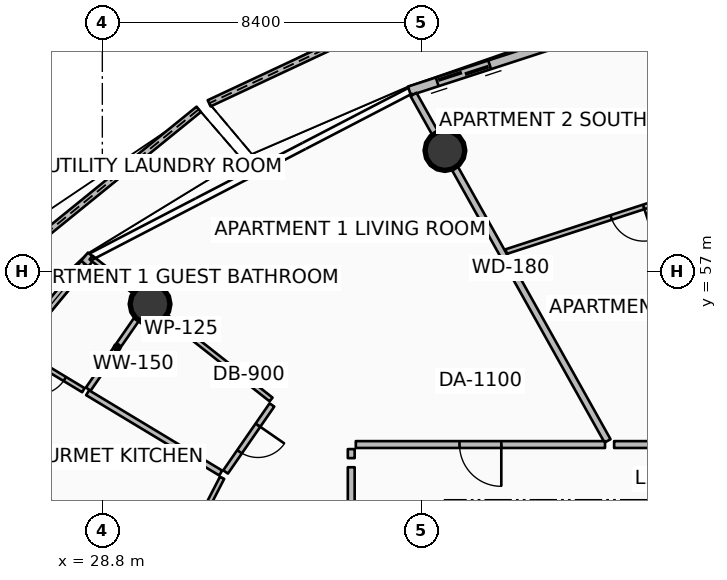
"""IFC4 building model, lengths in metres.
Left out: names, types, materials, properties, quantities, classifications, styles, units other than length and angle.
Written with IfcOpenShell. Run it as: python <this file> out.ifc"""

import sys

from ifc_helpers import new_model, si_unit, direction, frame, frame_2d, origin, origin_2d, place, context, subcontext, project, spatial, polyline, rectangle, circle, outline, extrude, element, fill, save


model = new_model("IFC4")
c1 = context("Model", 3, precision=1e-05, world=origin(), true_north=direction((0.0, 1.0)))
c2 = subcontext(c1, "Body", "Model", "MODEL_VIEW")
j1 = project(units=[si_unit("LENGTHUNIT", "METRE"), si_unit("PLANEANGLEUNIT", "RADIAN")], contexts=[c1])
p1 = place(None, origin())
s1 = spatial("IfcSite", under=j1, at=p1, CompositionType="ELEMENT")
p2 = place(p1, origin())
s2 = spatial("IfcBuilding", under=s1, at=p2, CompositionType="ELEMENT")
p3 = place(p2, frame((0.0, 0.0, 217.8)))
s3 = spatial("IfcBuildingStorey", under=s2, at=p3, CompositionType="ELEMENT", Elevation=217.8)
for number, where, z_axis, x_axis in (
    (1, (37.815, 60.186, 0.0), (0.0, 0.0, 1.0), (1.0, 0.0, 0.0)),
    (2, (30.056, 56.146, 0.0), (0.0, 0.0, 1.0), (1.0, 0.0, 0.0)),
):
    element("IfcColumn", number, at=place(p3, frame(where, z_axis=z_axis, x_axis=x_axis)), inside=s3, PredefinedType="COLUMN", context=c2, shape_type="SweptSolid", body=[
        extrude(circle(Radius=0.525, at=origin_2d()), origin(), (0.0, 0.0, 1.0), 3.5),
    ])
p4 = place(p3, frame((40.248, 65.472, 0.0), z_axis=(0.0, 0.0, 1.0), x_axis=(-0.905654672332, -0.42401605451, 0.0)))
e3 = element("IfcWall", 3, at=p4, inside=s3, PredefinedType="PARAPET", context=c2, shape_type="SweptSolid", body=[
    extrude(outline(polyline([(0.0, 0.0), (9.537, 0.0), (9.537, 1.233), (4.769, 1.418), (0.0, 1.632), (0.0, 0.0)])), frame((0.0, 0.09, 0.0), z_axis=(0.0, -1.0, 0.0), x_axis=(1.0, 0.0, 0.0)), (0.0, 0.0, 1.0), 0.18),
])
p5 = place(p3, frame((31.337, 61.271, 0.0), z_axis=(0.0, 0.0, 1.0), x_axis=(-0.776456761235, -0.630170530834, 0.0)))
e4 = element("IfcWall", 4, at=p5, inside=s3, PredefinedType="PARAPET", context=c2, shape_type="SweptSolid", body=[
    extrude(outline(polyline([(0.0, 0.0), (10.389, 0.0), (10.389, 1.148), (5.195, 1.127), (0.0, 1.224), (0.0, 0.0)])), frame((0.0, 0.09, 0.0), z_axis=(0.0, -1.0, 0.0), x_axis=(1.0, 0.0, 0.0)), (0.0, 0.0, 1.0), 0.18),
])
p6 = place(p3, frame((45.384, 64.519, 0.0), z_axis=(0.0, 0.0, 1.0), x_axis=(-0.951058543936, -0.309010753869, 0.0)))
e5 = element("IfcWall", 5, at=p6, inside=s3, PredefinedType="SOLIDWALL", context=c2, shape_type="SweptSolid", body=[
    extrude(rectangle(XDim=8.942, YDim=0.24, at=frame_2d((4.471, 0.0))), origin(), (0.0, 0.0, 1.0), 2.45),
])
p7 = place(p6, frame((6.722, 0.0, 0.0)))
e6 = element("IfcOpeningElement", 6, at=p7, cuts=e5, PredefinedType="OPENING", context=c2, shape_type="SweptSolid", body=[
    extrude(rectangle(XDim=1.45, YDim=2.15, at=frame_2d((0.725, 1.075))), frame((0.0, 0.13, 0.0), z_axis=(0.0, -1.0, 0.0), x_axis=(1.0, 0.0, 0.0)), (0.0, 0.0, 1.0), 0.26),
])
p8 = place(p6, frame((0.28, 0.0, 0.65)))
e7 = element("IfcOpeningElement", 7, at=p8, cuts=e5, PredefinedType="OPENING", context=c2, shape_type="SweptSolid", body=[
    extrude(rectangle(XDim=1.6, YDim=1.5, at=frame_2d((0.8, 0.75))), frame((0.0, 0.13, 0.0), z_axis=(0.0, -1.0, 0.0), x_axis=(1.0, 0.0, 0.0)), (0.0, 0.0, 1.0), 0.26),
])
p9 = place(p3, frame((28.515, 57.424, 0.0), z_axis=(0.0, 0.0, 1.0), x_axis=(-0.636759394418, -0.771062561418, 0.0)))
e8 = element("IfcWall", 8, at=p9, inside=s3, PredefinedType="SOLIDWALL", context=c2, shape_type="SweptSolid", body=[
    extrude(rectangle(XDim=10.494, YDim=0.24, at=frame_2d((5.247, 0.0))), origin(), (0.0, 0.0, 1.0), 2.45),
])
p10 = place(p9, frame((8.274, 0.0, 0.0)))
e9 = element("IfcOpeningElement", 9, at=p10, cuts=e8, PredefinedType="OPENING", context=c2, shape_type="SweptSolid", body=[
    extrude(rectangle(XDim=1.45, YDim=2.15, at=frame_2d((0.725, 1.075))), frame((0.0, 0.13, 0.0), z_axis=(0.0, -1.0, 0.0), x_axis=(1.0, 0.0, 0.0)), (0.0, 0.0, 1.0), 0.26),
])
p11 = place(p9, frame((0.28, 0.0, 0.65)))
e10 = element("IfcOpeningElement", 10, at=p11, cuts=e8, PredefinedType="OPENING", context=c2, shape_type="SweptSolid", body=[
    extrude(rectangle(XDim=1.6, YDim=1.5, at=frame_2d((0.8, 0.75))), frame((0.0, 0.13, 0.0), z_axis=(0.0, -1.0, 0.0), x_axis=(1.0, 0.0, 0.0)), (0.0, 0.0, 1.0), 0.26),
])
p12 = place(p3, frame((42.094, 52.546, 0.0), z_axis=(0.0, 0.0, 1.0), x_axis=(-0.488614041717, 0.872500039104, 0.0)))
e11 = element("IfcWall", 11, at=p12, inside=s3, PredefinedType="PARTITIONING", context=c2, shape_type="SweptSolid", body=[
    extrude(rectangle(XDim=10.448, YDim=0.18, at=frame_2d((5.224, 0.0))), origin(), (0.0, 0.0, 1.0), 2.94),
])
p13 = place(p3, frame((42.028, 52.45, 0.0), z_axis=(0.0, 0.0, 1.0), x_axis=(-1.0, 0.0, 0.0)))
e12 = element("IfcWall", 12, at=p13, inside=s3, PredefinedType="PARTITIONING", context=c2, shape_type="SweptSolid", body=[
    extrude(rectangle(XDim=6.558, YDim=0.18, at=frame_2d((3.279, 0.0))), origin(), (0.0, 0.0, 1.0), 2.94),
])
p14 = place(p13, frame((2.729, 0.0, 0.0)))
e13 = element("IfcOpeningElement", 13, at=p14, cuts=e12, PredefinedType="OPENING", context=c2, shape_type="SweptSolid", body=[
    extrude(rectangle(XDim=1.1, YDim=2.1, at=frame_2d((0.55, 1.05))), frame((0.0, 0.1, 0.0), z_axis=(0.0, -1.0, 0.0), x_axis=(1.0, 0.0, 0.0)), (0.0, 0.0, 1.0), 0.2),
])
p15 = place(p3, frame((35.35, 52.33, 0.0), z_axis=(0.0, 0.0, 1.0), x_axis=(0.0, -1.0, 0.0)))
e14 = element("IfcWall", 14, at=p15, inside=s3, PredefinedType="PARTITIONING", context=c2, shape_type="SweptSolid", body=[
    extrude(rectangle(XDim=0.238, YDim=0.18, at=frame_2d((0.119, 0.0))), origin(), (0.0, 0.0, 1.0), 2.94),
])
p16 = place(p3, frame((35.35, 51.853, 0.0), z_axis=(0.0, 0.0, 1.0), x_axis=(0.0, -1.0, 0.0)))
e15 = element("IfcWall", 15, at=p16, inside=s3, PredefinedType="PARTITIONING", context=c2, shape_type="SweptSolid", body=[
    extrude(rectangle(XDim=6.165, YDim=0.18, at=frame_2d((3.083, 0.0))), origin(), (0.0, 0.0, 1.0), 2.94),
])
p17 = place(p3, frame((33.241, 53.635, 0.0), z_axis=(0.0, 0.0, 1.0), x_axis=(-0.785321754625, 0.619087830371, 0.0)))
e16 = element("IfcWall", 16, at=p17, inside=s3, PredefinedType="PARTITIONING", context=c2, shape_type="SweptSolid", body=[
    extrude(rectangle(XDim=6.033, YDim=0.125, at=frame_2d((3.017, 0.0))), origin(), (0.0, 0.0, 1.0), 2.94),
])
p18 = place(p3, frame((33.262, 53.491, 0.0), z_axis=(0.0, 0.0, 1.0), x_axis=(-0.568919673568, -0.822393096413, 0.0)))
e17 = element("IfcWall", 17, at=p18, inside=s3, PredefinedType="PARTITIONING", context=c2, shape_type="SweptSolid", body=[
    extrude(rectangle(XDim=2.143, YDim=0.15, at=frame_2d((1.072, 0.0))), origin(), (0.0, 0.0, 1.0), 2.94),
])
p19 = place(p18, frame((0.646, 0.0, 0.0)))
e18 = element("IfcOpeningElement", 18, at=p19, cuts=e17, PredefinedType="OPENING", context=c2, shape_type="SweptSolid", body=[
    extrude(rectangle(XDim=0.85, YDim=2.06, at=frame_2d((0.425, 1.03))), frame((0.0, 0.085, 0.0), z_axis=(0.0, -1.0, 0.0), x_axis=(1.0, 0.0, 0.0)), (0.0, 0.0, 1.0), 0.17),
])
p20 = place(p3, frame((29.948, 56.104, 0.0), z_axis=(0.0, 0.0, 1.0), x_axis=(-0.568843740651, -0.822445620526, 0.0)))
e19 = element("IfcWall", 19, at=p20, inside=s3, PredefinedType="PARTITIONING", context=c2, shape_type="SweptSolid", body=[
    extrude(rectangle(XDim=2.669, YDim=0.15, at=frame_2d((1.335, 0.0))), origin(), (0.0, 0.0, 1.0), 2.94),
])
p21 = place(p3, frame((31.915, 51.701, 0.0), z_axis=(0.0, 0.0, 1.0), x_axis=(-0.856305556185, 0.516469548422, 0.0)))
e20 = element("IfcWall", 20, at=p21, inside=s3, PredefinedType="PARTITIONING", context=c2, shape_type="SweptSolid", body=[
    extrude(rectangle(XDim=4.09, YDim=0.15, at=frame_2d((2.045, 0.0))), origin(), (0.0, 0.0, 1.0), 2.94),
])
p22 = place(p3, frame((28.302, 53.881, 0.0), z_axis=(0.0, 0.0, 1.0), x_axis=(-0.856354175531, 0.516388929056, 0.0)))
e21 = element("IfcWall", 21, at=p22, inside=s3, PredefinedType="PARTITIONING", context=c2, shape_type="SweptSolid", body=[
    extrude(rectangle(XDim=1.99, YDim=0.125, at=frame_2d((0.995, 0.0))), origin(), (0.0, 0.0, 1.0), 2.94),
])
p23 = place(p22, frame((0.57, 0.0, 0.0)))
e22 = element("IfcOpeningElement", 22, at=p23, cuts=e21, PredefinedType="OPENING", context=c2, shape_type="SweptSolid", body=[
    extrude(rectangle(XDim=0.85, YDim=2.06, at=frame_2d((0.425, 1.03))), frame((0.0, 0.073, 0.0), z_axis=(0.0, -1.0, 0.0), x_axis=(1.0, 0.0, 0.0)), (0.0, 0.0, 1.0), 0.145),
])
p24 = place(p3, frame((30.764, 49.467, 0.0), z_axis=(0.0, 0.0, 1.0), x_axis=(-0.917605566125, 0.397492169755, 0.0)))
e23 = element("IfcWall", 23, at=p24, inside=s3, PredefinedType="PARTITIONING", context=c2, shape_type="SweptSolid", body=[
    extrude(rectangle(XDim=6.955, YDim=0.125, at=frame_2d((3.477, 0.0))), origin(), (0.0, 0.0, 1.0), 2.94),
])
p25 = place(p3, frame((31.951, 51.575, 0.0), z_axis=(0.0, 0.0, 1.0), x_axis=(-0.458029312051, -0.88893708962, 0.0)))
e24 = element("IfcWall", 24, at=p25, inside=s3, PredefinedType="PARTITIONING", context=c2, shape_type="SweptSolid", body=[
    extrude(rectangle(XDim=2.332, YDim=0.125, at=frame_2d((1.166, 0.0))), origin(), (0.0, 0.0, 1.0), 2.94),
])
p26 = place(p25, frame((0.741, 0.0, 0.0)))
e25 = element("IfcOpeningElement", 25, at=p26, cuts=e24, PredefinedType="OPENING", context=c2, shape_type="SweptSolid", body=[
    extrude(rectangle(XDim=0.85, YDim=2.06, at=frame_2d((0.425, 1.03))), frame((0.0, 0.073, 0.0), z_axis=(0.0, -1.0, 0.0), x_axis=(1.0, 0.0, 0.0)), (0.0, 0.0, 1.0), 0.145),
])
p27 = place(p3, frame((46.643, 52.45, 0.0), z_axis=(0.0, 0.0, 1.0), x_axis=(-1.0, 0.0, 0.0)))
e26 = element("IfcWall", 26, at=p27, inside=s3, PredefinedType="PARTITIONING", context=c2, shape_type="SweptSolid", body=[
    extrude(rectangle(XDim=4.376, YDim=0.18, at=frame_2d((2.188, 0.0))), origin(), (0.0, 0.0, 1.0), 2.94),
])
p28 = place(p3, frame((45.808, 59.6, 0.0), z_axis=(0.0, 0.0, 1.0), x_axis=(-0.951057868445, -0.309012832854, 0.0)))
e27 = element("IfcWall", 27, at=p28, inside=s3, PredefinedType="PARTITIONING", context=c2, shape_type="SweptSolid", body=[
    extrude(rectangle(XDim=6.708, YDim=0.125, at=frame_2d((3.354, 0.0))), origin(), (0.0, 0.0, 1.0), 2.94),
])
p29 = place(p28, frame((2.904, 0.0, 0.0)))
e28 = element("IfcOpeningElement", 28, at=p29, cuts=e27, PredefinedType="OPENING", context=c2, shape_type="SweptSolid", body=[
    extrude(rectangle(XDim=0.9, YDim=2.08, at=frame_2d((0.45, 1.04))), frame((0.0, 0.073, 0.0), z_axis=(0.0, -1.0, 0.0), x_axis=(1.0, 0.0, 0.0)), (0.0, 0.0, 1.0), 0.145),
])
p30 = place(p7, origin())
e29 = element("IfcDoor", 29, at=p30, inside=s3, OperationType="DOUBLE_DOOR_SLIDING", PredefinedType="DOOR", context=c2, shape_type="SweptSolid", body=[
    extrude(rectangle(XDim=1.45, YDim=2.15, at=frame_2d((0.725, 1.075))), frame((0.0, 0.025, 0.0), z_axis=(0.0, -1.0, 0.0), x_axis=(1.0, 0.0, 0.0)), (0.0, 0.0, 1.0), 0.05),
])
fill(e6, e29)
p31 = place(p11, origin())
e30 = element("IfcWindow", 30, at=p31, inside=s3, PartitioningType="SINGLE_PANEL", PredefinedType="WINDOW", context=c2, shape_type="SweptSolid", body=[
    extrude(rectangle(XDim=1.6, YDim=1.5, at=frame_2d((0.8, 0.75))), frame((0.0, 0.03, 0.0), z_axis=(0.0, -1.0, 0.0), x_axis=(1.0, 0.0, 0.0)), (0.0, 0.0, 1.0), 0.06),
])
fill(e10, e30)
p32 = place(p14, origin())
e31 = element("IfcDoor", 31, at=p32, inside=s3, OperationType="SINGLE_SWING_LEFT", PredefinedType="DOOR", context=c2, shape_type="SweptSolid", body=[
    extrude(rectangle(XDim=1.1, YDim=2.1, at=frame_2d((0.55, 1.05))), frame((0.0, 0.025, 0.0), z_axis=(0.0, -1.0, 0.0), x_axis=(1.0, 0.0, 0.0)), (0.0, 0.0, 1.0), 0.05),
])
fill(e13, e31)
p33 = place(p19, origin())
e32 = element("IfcDoor", 32, at=p33, inside=s3, OperationType="SINGLE_SWING_LEFT", PredefinedType="DOOR", context=c2, shape_type="SweptSolid", body=[
    extrude(rectangle(XDim=0.85, YDim=2.06, at=frame_2d((0.425, 1.03))), frame((0.0, 0.025, 0.0), z_axis=(0.0, -1.0, 0.0), x_axis=(1.0, 0.0, 0.0)), (0.0, 0.0, 1.0), 0.05),
])
fill(e18, e32)
p34 = place(p23, origin())
e33 = element("IfcDoor", 33, at=p34, inside=s3, OperationType="SINGLE_SWING_RIGHT", PredefinedType="DOOR", context=c2, shape_type="SweptSolid", body=[
    extrude(rectangle(XDim=0.85, YDim=2.06, at=frame_2d((0.425, 1.03))), frame((0.0, 0.025, 0.0), z_axis=(0.0, -1.0, 0.0), x_axis=(1.0, 0.0, 0.0)), (0.0, 0.0, 1.0), 0.05),
])
fill(e22, e33)
p35 = place(p29, origin())
e34 = element("IfcDoor", 34, at=p35, inside=s3, OperationType="SINGLE_SWING_LEFT", PredefinedType="DOOR", context=c2, shape_type="SweptSolid", body=[
    extrude(rectangle(XDim=0.9, YDim=2.08, at=frame_2d((0.45, 1.04))), frame((0.0, 0.025, 0.0), z_axis=(0.0, -1.0, 0.0), x_axis=(1.0, 0.0, 0.0)), (0.0, 0.0, 1.0), 0.05),
])
fill(e28, e34)
save(model, sys.argv[1])
